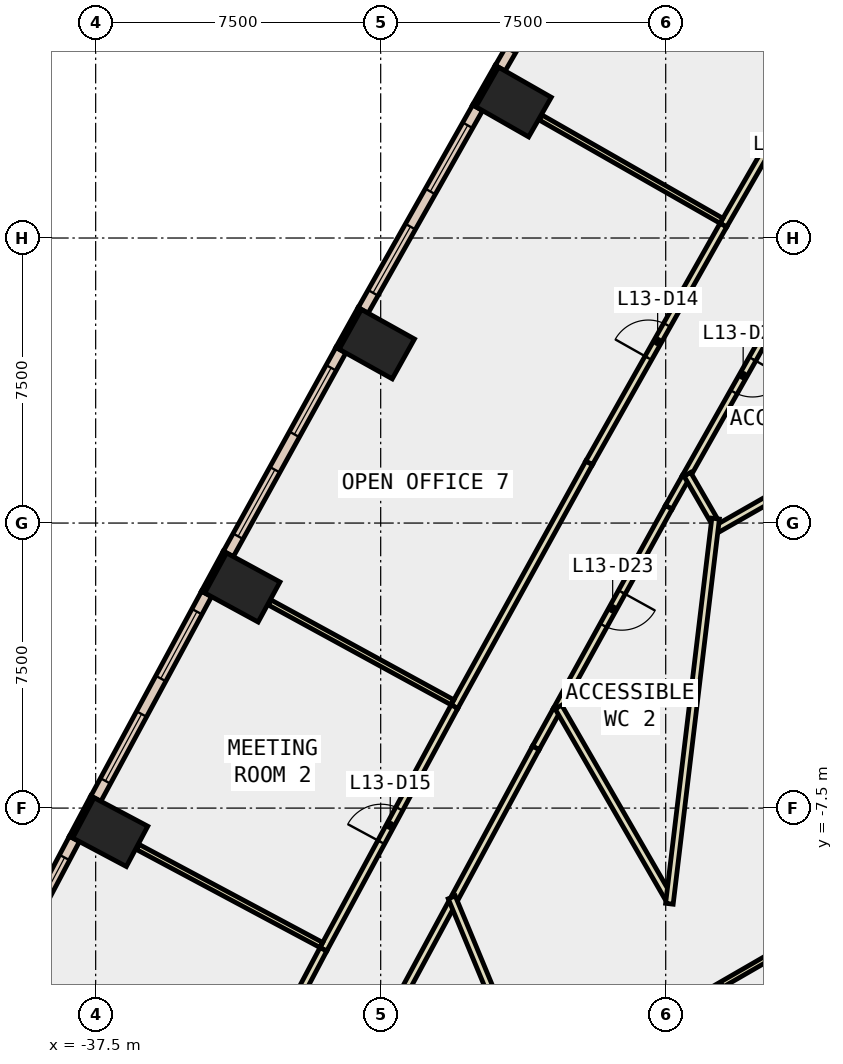
"""IFC4 building model, lengths in metres.
Left out: names, types, materials, properties, quantities, classifications, styles, units other than length and angle.
Written with IfcOpenShell. Run it as: python <this file> out.ifc"""

import sys

from ifc_helpers import new_model, si_unit, direction, frame, frame_2d, origin, origin_2d, place, context, subcontext, project, spatial, rectangle, extrude, element, fill, save


model = new_model("IFC4")
c1 = context("Model", 3, precision=1e-05, world=origin(), true_north=direction((0.0, 1.0)))
c2 = subcontext(c1, "Body", "Model", "MODEL_VIEW")
j1 = project(units=[si_unit("LENGTHUNIT", "METRE"), si_unit("PLANEANGLEUNIT", "RADIAN")], contexts=[c1])
p1 = place(None, origin())
s1 = spatial("IfcSite", under=j1, at=p1, CompositionType="ELEMENT")
p2 = place(p1, origin())
s2 = spatial("IfcBuilding", under=s1, at=p2, CompositionType="ELEMENT")
p3 = place(p2, frame((0.0, 0.0, 64.4)))
s3 = spatial("IfcBuildingStorey", under=s2, at=p3, CompositionType="ELEMENT", Elevation=64.4)
for number, where, z_axis, x_axis in (
    (1, (-26.503, 11.078, -0.4), (0.0, 0.0, 1.0), (0.496, 0.869, 0.0)),
    (2, (-30.102, 4.708, -0.4), (0.0, 0.0, 1.0), (0.487, 0.873, 0.0)),
    (3, (-33.64, -1.695, -0.4), (0.0, 0.0, 1.0), (0.478, 0.878, 0.0)),
    (4, (-37.117, -8.132, -0.4), (0.0, 0.0, 1.0), (0.469, 0.883, 0.0)),
):
    element("IfcColumn", number, at=place(p3, frame(where, z_axis=z_axis, x_axis=x_axis)), inside=s3, PredefinedType="COLUMN", context=c2, shape_type="SweptSolid", body=[
        extrude(rectangle(XDim=1.2, YDim=1.6, at=origin_2d()), origin(), (0.0, 0.0, 1.0), 4.2),
    ])
p4 = place(p3, frame((-26.944, 12.02, 0.0), z_axis=(0.0, 0.0, 1.0), x_axis=(-0.495854054996, -0.868405870629, 0.0)))
e5 = element("IfcWall", 5, at=p4, inside=s3, PredefinedType="STANDARD", context=c2, shape_type="SweptSolid", body=[
    extrude(rectangle(XDim=1.2, YDim=0.1, at=frame_2d((0.6, 0.0))), origin(), (0.0, 0.0, 1.0), 3.8),
])
p5 = place(p3, frame((-30.552, 5.646, 0.0), z_axis=(0.0, 0.0, 1.0), x_axis=(-0.486730996044, -0.87355190887, 0.0)))
e6 = element("IfcWall", 6, at=p5, inside=s3, PredefinedType="STANDARD", context=c2, shape_type="SweptSolid", body=[
    extrude(rectangle(XDim=1.2, YDim=0.1, at=frame_2d((0.6, 0.0))), origin(), (0.0, 0.0, 1.0), 3.8),
])
p6 = place(p3, frame((-34.099, -0.762, 0.0), z_axis=(0.0, 0.0, 1.0), x_axis=(-0.478267644701, -0.878214131082, 0.0)))
e7 = element("IfcWall", 7, at=p6, inside=s3, PredefinedType="STANDARD", context=c2, shape_type="SweptSolid", body=[
    extrude(rectangle(XDim=1.2, YDim=0.1, at=frame_2d((0.6, 0.0))), origin(), (0.0, 0.0, 1.0), 3.8),
])
p7 = place(p3, frame((-37.586, -7.204, 0.0), z_axis=(0.0, 0.0, 1.0), x_axis=(-0.469467784567, -0.882949601763, 0.0)))
e8 = element("IfcWall", 8, at=p7, inside=s3, PredefinedType="STANDARD", context=c2, shape_type="SweptSolid", body=[
    extrude(rectangle(XDim=1.199, YDim=0.1, at=frame_2d((0.6, 0.0))), origin(), (0.0, 0.0, 1.0), 3.8),
])
p8 = place(p3, frame((-23.793, 17.273, 0.0), z_axis=(0.0, 0.0, 1.0), x_axis=(-0.499903021601, -0.86608138705, 0.0)))
e9 = element("IfcWall", 9, at=p8, inside=s3, PredefinedType="STANDARD", context=c2, shape_type="SweptSolid", body=[
    extrude(rectangle(XDim=6.125, YDim=0.3, at=frame_2d((3.062, 0.0))), origin(), (0.0, 0.0, 1.0), 3.8),
])
p9 = place(p8, frame((0.531, 0.0, 0.9)))
e10 = element("IfcOpeningElement", 10, at=p9, cuts=e9, PredefinedType="OPENING", context=c2, shape_type="SweptSolid", body=[
    extrude(rectangle(XDim=2.0, YDim=2.6, at=frame_2d((1.0, 1.3))), frame((0.0, 0.16, 0.0), z_axis=(0.0, -1.0, 0.0), x_axis=(1.0, 0.0, 0.0)), (0.0, 0.0, 1.0), 0.32),
])
p10 = place(p8, frame((3.594, 0.0, 0.9)))
e11 = element("IfcOpeningElement", 11, at=p10, cuts=e9, PredefinedType="OPENING", context=c2, shape_type="SweptSolid", body=[
    extrude(rectangle(XDim=2.0, YDim=2.6, at=frame_2d((1.0, 1.3))), frame((0.0, 0.16, 0.0), z_axis=(0.0, -1.0, 0.0), x_axis=(1.0, 0.0, 0.0)), (0.0, 0.0, 1.0), 0.32),
])
p11 = place(p3, frame((-27.449, 10.928, 0.0), z_axis=(0.0, 0.0, 1.0), x_axis=(-0.491887822214, -0.870658584267, 0.0)))
e12 = element("IfcWall", 12, at=p11, inside=s3, PredefinedType="STANDARD", context=c2, shape_type="SweptSolid", body=[
    extrude(rectangle(XDim=6.125, YDim=0.3, at=frame_2d((3.062, 0.0))), origin(), (0.0, 0.0, 1.0), 3.8),
])
p12 = place(p11, frame((0.531, 0.0, 0.9)))
e13 = element("IfcOpeningElement", 13, at=p12, cuts=e12, PredefinedType="OPENING", context=c2, shape_type="SweptSolid", body=[
    extrude(rectangle(XDim=2.0, YDim=2.6, at=frame_2d((1.0, 1.3))), frame((0.0, 0.16, 0.0), z_axis=(0.0, -1.0, 0.0), x_axis=(1.0, 0.0, 0.0)), (0.0, 0.0, 1.0), 0.32),
])
p13 = place(p11, frame((3.594, 0.0, 0.9)))
e14 = element("IfcOpeningElement", 14, at=p13, cuts=e12, PredefinedType="OPENING", context=c2, shape_type="SweptSolid", body=[
    extrude(rectangle(XDim=2.0, YDim=2.6, at=frame_2d((1.0, 1.3))), frame((0.0, 0.16, 0.0), z_axis=(0.0, -1.0, 0.0), x_axis=(1.0, 0.0, 0.0)), (0.0, 0.0, 1.0), 0.32),
])
p14 = place(p3, frame((-31.047, 4.549, 0.0), z_axis=(0.0, 0.0, 1.0), x_axis=(-0.483587271547, -0.875296150339, 0.0)))
e15 = element("IfcWall", 15, at=p14, inside=s3, PredefinedType="STANDARD", context=c2, shape_type="SweptSolid", body=[
    extrude(rectangle(XDim=6.125, YDim=0.3, at=frame_2d((3.062, 0.0))), origin(), (0.0, 0.0, 1.0), 3.8),
])
p15 = place(p14, frame((0.531, 0.0, 0.9)))
e16 = element("IfcOpeningElement", 16, at=p15, cuts=e15, PredefinedType="OPENING", context=c2, shape_type="SweptSolid", body=[
    extrude(rectangle(XDim=2.0, YDim=2.6, at=frame_2d((1.0, 1.3))), frame((0.0, 0.16, 0.0), z_axis=(0.0, -1.0, 0.0), x_axis=(1.0, 0.0, 0.0)), (0.0, 0.0, 1.0), 0.32),
])
p16 = place(p14, frame((3.594, 0.0, 0.9)))
e17 = element("IfcOpeningElement", 17, at=p16, cuts=e15, PredefinedType="OPENING", context=c2, shape_type="SweptSolid", body=[
    extrude(rectangle(XDim=2.0, YDim=2.6, at=frame_2d((1.0, 1.3))), frame((0.0, 0.16, 0.0), z_axis=(0.0, -1.0, 0.0), x_axis=(1.0, 0.0, 0.0)), (0.0, 0.0, 1.0), 0.32),
])
p17 = place(p3, frame((-34.583, -1.864, 0.0), z_axis=(0.0, 0.0, 1.0), x_axis=(-0.475413659872, -0.879762383833, 0.0)))
e18 = element("IfcWall", 18, at=p17, inside=s3, PredefinedType="STANDARD", context=c2, shape_type="SweptSolid", body=[
    extrude(rectangle(XDim=6.125, YDim=0.3, at=frame_2d((3.063, 0.0))), origin(), (0.0, 0.0, 1.0), 3.8),
])
p18 = place(p17, frame((0.531, 0.0, 0.9)))
e19 = element("IfcOpeningElement", 19, at=p18, cuts=e18, PredefinedType="OPENING", context=c2, shape_type="SweptSolid", body=[
    extrude(rectangle(XDim=2.0, YDim=2.6, at=frame_2d((1.0, 1.3))), frame((0.0, 0.16, 0.0), z_axis=(0.0, -1.0, 0.0), x_axis=(1.0, 0.0, 0.0)), (0.0, 0.0, 1.0), 0.32),
])
p19 = place(p17, frame((3.594, 0.0, 0.9)))
e20 = element("IfcOpeningElement", 20, at=p19, cuts=e18, PredefinedType="OPENING", context=c2, shape_type="SweptSolid", body=[
    extrude(rectangle(XDim=2.0, YDim=2.6, at=frame_2d((1.0, 1.3))), frame((0.0, 0.16, 0.0), z_axis=(0.0, -1.0, 0.0), x_axis=(1.0, 0.0, 0.0)), (0.0, 0.0, 1.0), 0.32),
])
p20 = place(p3, frame((-38.059, -8.31, 0.0), z_axis=(0.0, 0.0, 1.0), x_axis=(-0.467041710902, -0.884235285587, 0.0)))
e21 = element("IfcWall", 21, at=p20, inside=s3, PredefinedType="STANDARD", context=c2, shape_type="SweptSolid", body=[
    extrude(rectangle(XDim=6.22, YDim=0.3, at=frame_2d((3.11, 0.0))), origin(), (0.0, 0.0, 1.0), 3.8),
])
p21 = place(p20, frame((0.555, 0.0, 0.9)))
e22 = element("IfcOpeningElement", 22, at=p21, cuts=e21, PredefinedType="OPENING", context=c2, shape_type="SweptSolid", body=[
    extrude(rectangle(XDim=2.0, YDim=2.6, at=frame_2d((1.0, 1.3))), frame((0.0, 0.16, 0.0), z_axis=(0.0, -1.0, 0.0), x_axis=(1.0, 0.0, 0.0)), (0.0, 0.0, 1.0), 0.32),
])
p22 = place(p20, frame((3.665, 0.0, 0.9)))
e23 = element("IfcOpeningElement", 23, at=p22, cuts=e21, PredefinedType="OPENING", context=c2, shape_type="SweptSolid", body=[
    extrude(rectangle(XDim=2.0, YDim=2.6, at=frame_2d((1.0, 1.3))), frame((0.0, 0.16, 0.0), z_axis=(0.0, -1.0, 0.0), x_axis=(1.0, 0.0, 0.0)), (0.0, 0.0, 1.0), 0.32),
])
p23 = place(p3, frame((-18.945, 6.567, 0.0), z_axis=(0.0, 0.0, 1.0), x_axis=(-0.491840751019, -0.87068517596, 0.0)))
e24 = element("IfcWall", 24, at=p23, inside=s3, PredefinedType="PARTITIONING", context=c2, shape_type="SweptSolid", body=[
    extrude(rectangle(XDim=6.168, YDim=0.2, at=frame_2d((3.084, 0.0))), origin(), (0.0, 0.0, 1.0), 3.8),
])
p24 = place(p23, frame((2.584, 0.0, 0.0)))
e25 = element("IfcOpeningElement", 25, at=p24, cuts=e24, PredefinedType="OPENING", context=c2, shape_type="SweptSolid", body=[
    extrude(rectangle(XDim=1.0, YDim=2.1, at=frame_2d((0.5, 1.05))), frame((0.0, 0.11, 0.0), z_axis=(0.0, -1.0, 0.0), x_axis=(1.0, 0.0, 0.0)), (0.0, 0.0, 1.0), 0.22),
])
p25 = place(p3, frame((-25.371, -4.927, 0.0), z_axis=(0.0, 0.0, 1.0), x_axis=(-0.483899488004, -0.875123582993, 0.0)))
e26 = element("IfcWall", 26, at=p25, inside=s3, PredefinedType="PARTITIONING", context=c2, shape_type="SweptSolid", body=[
    extrude(rectangle(XDim=1.13, YDim=0.2, at=frame_2d((0.565, 0.0))), origin(), (0.0, 0.0, 1.0), 3.8),
])
p26 = place(p3, frame((-25.918, -5.916, 0.0), z_axis=(0.0, 0.0, 1.0), x_axis=(-0.4752384902, -0.879857021016, 0.0)))
e27 = element("IfcWall", 27, at=p26, inside=s3, PredefinedType="PARTITIONING", context=c2, shape_type="SweptSolid", body=[
    extrude(rectangle(XDim=4.473, YDim=0.2, at=frame_2d((2.237, 0.0))), origin(), (0.0, 0.0, 1.0), 3.8),
])
p27 = place(p3, frame((-21.979, 1.196, 0.0), z_axis=(0.0, 0.0, 1.0), x_axis=(-0.491617674369, -0.870811151886, 0.0)))
e28 = element("IfcWall", 28, at=p27, inside=s3, PredefinedType="PARTITIONING", context=c2, shape_type="SweptSolid", body=[
    extrude(rectangle(XDim=0.897, YDim=0.2, at=frame_2d((0.448, 0.0))), origin(), (0.0, 0.0, 1.0), 3.8),
])
p28 = place(p3, frame((-22.42, 0.415, 0.0), z_axis=(0.0, 0.0, 1.0), x_axis=(-0.483559496818, -0.875311494861, 0.0)))
e29 = element("IfcWall", 29, at=p28, inside=s3, PredefinedType="PARTITIONING", context=c2, shape_type="SweptSolid", body=[
    extrude(rectangle(XDim=6.103, YDim=0.2, at=frame_2d((3.052, 0.0))), origin(), (0.0, 0.0, 1.0), 3.8),
])
p29 = place(p28, frame((2.552, 0.0, 0.0)))
e30 = element("IfcOpeningElement", 30, at=p29, cuts=e29, PredefinedType="OPENING", context=c2, shape_type="SweptSolid", body=[
    extrude(rectangle(XDim=1.0, YDim=2.1, at=frame_2d((0.5, 1.05))), frame((0.0, 0.11, 0.0), z_axis=(0.0, -1.0, 0.0), x_axis=(1.0, 0.0, 0.0)), (0.0, 0.0, 1.0), 0.22),
])
p30 = place(p3, frame((-28.139, -10.028, 0.0), z_axis=(0.0, 0.0, 1.0), x_axis=(-0.475287687013, -0.879830446491, 0.0)))
e31 = element("IfcWall", 31, at=p30, inside=s3, PredefinedType="PARTITIONING", context=c2, shape_type="SweptSolid", body=[
    extrude(rectangle(XDim=2.561, YDim=0.2, at=frame_2d((1.28, 0.0))), origin(), (0.0, 0.0, 1.0), 3.8),
])
p31 = place(p3, frame((-17.356, 14.122, 0.0), z_axis=(0.0, 0.0, 1.0), x_axis=(-0.499946764175, -0.866056137321, 0.0)))
e32 = element("IfcWall", 32, at=p31, inside=s3, PredefinedType="PARTITIONING", context=c2, shape_type="SweptSolid", body=[
    extrude(rectangle(XDim=7.255, YDim=0.2, at=frame_2d((3.627, 0.0))), origin(), (0.0, 0.0, 1.0), 3.8),
])
p32 = place(p31, frame((3.052, 0.0, 0.0)))
e33 = element("IfcOpeningElement", 33, at=p32, cuts=e32, PredefinedType="OPENING", context=c2, shape_type="SweptSolid", body=[
    extrude(rectangle(XDim=1.0, YDim=2.1, at=frame_2d((0.5, 1.05))), frame((0.0, 0.11, 0.0), z_axis=(0.0, -1.0, 0.0), x_axis=(1.0, 0.0, 0.0)), (0.0, 0.0, 1.0), 0.22),
])
p33 = place(p3, frame((-28.06, -4.831, 0.0), z_axis=(0.0, 0.0, 1.0), x_axis=(0.483631054848, 0.875271959328, 0.0)))
e34 = element("IfcWall", 34, at=p33, inside=s3, PredefinedType="PARTITIONING", context=c2, shape_type="SweptSolid", body=[
    extrude(rectangle(XDim=7.33, YDim=0.2, at=frame_2d((3.665, 0.0))), origin(), (0.0, 0.0, 1.0), 3.8),
])
p34 = place(p3, frame((-24.515, 1.585, 0.0), z_axis=(0.0, 0.0, 1.0), x_axis=(0.49174361417, 0.870740040381, 0.0)))
e35 = element("IfcWall", 35, at=p34, inside=s3, PredefinedType="PARTITIONING", context=c2, shape_type="SweptSolid", body=[
    extrude(rectangle(XDim=7.183, YDim=0.2, at=frame_2d((3.591, 0.0))), origin(), (0.0, 0.0, 1.0), 3.8),
])
p35 = place(p34, frame((3.166, 0.0, 0.0)))
e36 = element("IfcOpeningElement", 36, at=p35, cuts=e35, PredefinedType="OPENING", context=c2, shape_type="SweptSolid", body=[
    extrude(rectangle(XDim=1.0, YDim=2.1, at=frame_2d((0.5, 1.05))), frame((0.0, 0.11, 0.0), z_axis=(0.0, -1.0, 0.0), x_axis=(1.0, 0.0, 0.0)), (0.0, 0.0, 1.0), 0.22),
])
p36 = place(p3, frame((-31.509, -11.216, 0.0), z_axis=(0.0, 0.0, 1.0), x_axis=(0.475367159168, 0.879787510701, 0.0)))
e37 = element("IfcWall", 37, at=p36, inside=s3, PredefinedType="PARTITIONING", context=c2, shape_type="SweptSolid", body=[
    extrude(rectangle(XDim=7.257, YDim=0.2, at=frame_2d((3.629, 0.0))), origin(), (0.0, 0.0, 1.0), 3.8),
])
p37 = place(p36, frame((3.203, 0.0, 0.0)))
e38 = element("IfcOpeningElement", 38, at=p37, cuts=e37, PredefinedType="OPENING", context=c2, shape_type="SweptSolid", body=[
    extrude(rectangle(XDim=1.0, YDim=2.1, at=frame_2d((0.5, 1.05))), frame((0.0, 0.11, 0.0), z_axis=(0.0, -1.0, 0.0), x_axis=(1.0, 0.0, 0.0)), (0.0, 0.0, 1.0), 0.22),
])
p38 = place(p3, frame((-34.692, -17.243, 0.0), z_axis=(0.0, 0.0, 1.0), x_axis=(0.467102540817, 0.884203153332, 0.0)))
e39 = element("IfcWall", 39, at=p38, inside=s3, PredefinedType="PARTITIONING", context=c2, shape_type="SweptSolid", body=[
    extrude(rectangle(XDim=6.816, YDim=0.2, at=frame_2d((3.408, 0.0))), origin(), (0.0, 0.0, 1.0), 3.8),
])
p39 = place(p38, frame((2.946, 0.0, 0.0)))
e40 = element("IfcOpeningElement", 40, at=p39, cuts=e39, PredefinedType="OPENING", context=c2, shape_type="SweptSolid", body=[
    extrude(rectangle(XDim=1.0, YDim=2.1, at=frame_2d((0.5, 1.05))), frame((0.0, 0.11, 0.0), z_axis=(0.0, -1.0, 0.0), x_axis=(1.0, 0.0, 0.0)), (0.0, 0.0, 1.0), 0.22),
])
p40 = place(p3, frame((-14.946, 3.387, 0.0), z_axis=(0.0, 0.0, 1.0), x_axis=(-0.868556003823, -0.4955910292, 0.0)))
e41 = element("IfcWall", 41, at=p40, inside=s3, PredefinedType="PARTITIONING", context=c2, shape_type="SweptSolid", body=[
    extrude(rectangle(XDim=7.199, YDim=0.2, at=frame_2d((3.6, 0.0))), origin(), (0.0, 0.0, 1.0), 3.8),
])
p41 = place(p3, frame((-21.249, 0.105, 0.0), z_axis=(0.0, 0.0, 1.0), x_axis=(-0.500442009317, 0.865770059144, 0.0)))
e42 = element("IfcWall", 42, at=p41, inside=s3, PredefinedType="PARTITIONING", context=c2, shape_type="SweptSolid", body=[
    extrude(rectangle(XDim=1.361, YDim=0.2, at=frame_2d((0.68, 0.0))), origin(), (0.0, 0.0, 1.0), 3.8),
])
p42 = place(p3, frame((-25.323, -4.84, 0.0), z_axis=(0.0, 0.0, 1.0), x_axis=(0.500070797646, -0.865984524886, 0.0)))
e43 = element("IfcWall", 43, at=p42, inside=s3, PredefinedType="PARTITIONING", context=c2, shape_type="SweptSolid", body=[
    extrude(rectangle(XDim=5.763, YDim=0.2, at=frame_2d((2.882, 0.0))), origin(), (0.0, 0.0, 1.0), 3.8),
])
p43 = place(p3, frame((-22.403, -10.017, 0.0), z_axis=(0.0, 0.0, 1.0), x_axis=(0.119143334217, 0.992877064853, 0.0)))
e44 = element("IfcWall", 44, at=p43, inside=s3, PredefinedType="PARTITIONING", context=c2, shape_type="SweptSolid", body=[
    extrude(rectangle(XDim=10.207, YDim=0.2, at=frame_2d((5.104, 0.0))), origin(), (0.0, 0.0, 1.0), 3.8),
])
p44 = place(p3, frame((-17.103, -9.878, 0.0), z_axis=(0.0, 0.0, 1.0), x_axis=(-0.866013358989, -0.500020861617, 0.0)))
e45 = element("IfcWall", 45, at=p44, inside=s3, PredefinedType="PARTITIONING", context=c2, shape_type="SweptSolid", body=[
    extrude(rectangle(XDim=4.674, YDim=0.15, at=frame_2d((2.337, 0.0))), origin(), (0.0, 0.0, 1.0), 3.8),
])
p45 = place(p3, frame((-26.015, -14.946, 0.0), z_axis=(0.0, 0.0, 1.0), x_axis=(-0.383189005855, 0.923669955012, 0.0)))
e46 = element("IfcWall", 46, at=p45, inside=s3, PredefinedType="PARTITIONING", context=c2, shape_type="SweptSolid", body=[
    extrude(rectangle(XDim=5.52, YDim=0.2, at=frame_2d((2.76, 0.0))), origin(), (0.0, 0.0, 1.0), 3.8),
])
p46 = place(p3, frame((-16.767, -19.658, 0.0), z_axis=(0.0, 0.0, 1.0), x_axis=(-0.500083586486, 0.865977139726, 0.0)))
e47 = element("IfcWall", 47, at=p46, inside=s3, PredefinedType="PARTITIONING", context=c2, shape_type="SweptSolid", body=[
    extrude(rectangle(XDim=8.68, YDim=0.15, at=frame_2d((4.34, 0.0))), origin(), (0.0, 0.0, 1.0), 3.8),
])
p47 = place(p3, frame((-21.033, 7.953, 0.0), z_axis=(0.0, 0.0, 1.0), x_axis=(-0.868311678357, 0.496018980715, 0.0)))
e48 = element("IfcWall", 48, at=p47, inside=s3, PredefinedType="PARTITIONING", context=c2, shape_type="SweptSolid", body=[
    extrude(rectangle(XDim=5.48, YDim=0.15, at=frame_2d((2.74, 0.0))), origin(), (0.0, 0.0, 1.0), 3.8),
])
p48 = place(p3, frame((-28.111, -4.717, 0.0), z_axis=(0.0, 0.0, 1.0), x_axis=(-0.877558297547, 0.479469951515, 0.0)))
e49 = element("IfcWall", 49, at=p48, inside=s3, PredefinedType="PARTITIONING", context=c2, shape_type="SweptSolid", body=[
    extrude(rectangle(XDim=5.481, YDim=0.15, at=frame_2d((2.74, 0.0))), origin(), (0.0, 0.0, 1.0), 3.8),
])
p49 = place(p3, frame((-31.561, -11.103, 0.0), z_axis=(0.0, 0.0, 1.0), x_axis=(-0.882056805494, 0.47114306944, 0.0)))
e50 = element("IfcWall", 50, at=p49, inside=s3, PredefinedType="PARTITIONING", context=c2, shape_type="SweptSolid", body=[
    extrude(rectangle(XDim=5.48, YDim=0.15, at=frame_2d((2.74, 0.0))), origin(), (0.0, 0.0, 1.0), 3.8),
])
p50 = place(p12, origin())
e51 = element("IfcWindow", 51, at=p50, inside=s3, PartitioningType="SINGLE_PANEL", PredefinedType="WINDOW", context=c2, shape_type="SweptSolid", body=[
    extrude(rectangle(XDim=2.0, YDim=2.6, at=frame_2d((1.0, 1.3))), frame((0.0, 0.03, 0.0), z_axis=(0.0, -1.0, 0.0), x_axis=(1.0, 0.0, 0.0)), (0.0, 0.0, 1.0), 0.06),
])
fill(e13, e51)
p51 = place(p13, origin())
e52 = element("IfcWindow", 52, at=p51, inside=s3, PartitioningType="SINGLE_PANEL", PredefinedType="WINDOW", context=c2, shape_type="SweptSolid", body=[
    extrude(rectangle(XDim=2.0, YDim=2.6, at=frame_2d((1.0, 1.3))), frame((0.0, 0.03, 0.0), z_axis=(0.0, -1.0, 0.0), x_axis=(1.0, 0.0, 0.0)), (0.0, 0.0, 1.0), 0.06),
])
fill(e14, e52)
p52 = place(p15, origin())
e53 = element("IfcWindow", 53, at=p52, inside=s3, PartitioningType="SINGLE_PANEL", PredefinedType="WINDOW", context=c2, shape_type="SweptSolid", body=[
    extrude(rectangle(XDim=2.0, YDim=2.6, at=frame_2d((1.0, 1.3))), frame((0.0, 0.03, 0.0), z_axis=(0.0, -1.0, 0.0), x_axis=(1.0, 0.0, 0.0)), (0.0, 0.0, 1.0), 0.06),
])
fill(e16, e53)
p53 = place(p16, origin())
e54 = element("IfcWindow", 54, at=p53, inside=s3, PartitioningType="SINGLE_PANEL", PredefinedType="WINDOW", context=c2, shape_type="SweptSolid", body=[
    extrude(rectangle(XDim=2.0, YDim=2.6, at=frame_2d((1.0, 1.3))), frame((0.0, 0.03, 0.0), z_axis=(0.0, -1.0, 0.0), x_axis=(1.0, 0.0, 0.0)), (0.0, 0.0, 1.0), 0.06),
])
fill(e17, e54)
p54 = place(p18, origin())
e55 = element("IfcWindow", 55, at=p54, inside=s3, PartitioningType="SINGLE_PANEL", PredefinedType="WINDOW", context=c2, shape_type="SweptSolid", body=[
    extrude(rectangle(XDim=2.0, YDim=2.6, at=frame_2d((1.0, 1.3))), frame((0.0, 0.03, 0.0), z_axis=(0.0, -1.0, 0.0), x_axis=(1.0, 0.0, 0.0)), (0.0, 0.0, 1.0), 0.06),
])
fill(e19, e55)
p55 = place(p19, origin())
e56 = element("IfcWindow", 56, at=p55, inside=s3, PartitioningType="SINGLE_PANEL", PredefinedType="WINDOW", context=c2, shape_type="SweptSolid", body=[
    extrude(rectangle(XDim=2.0, YDim=2.6, at=frame_2d((1.0, 1.3))), frame((0.0, 0.03, 0.0), z_axis=(0.0, -1.0, 0.0), x_axis=(1.0, 0.0, 0.0)), (0.0, 0.0, 1.0), 0.06),
])
fill(e20, e56)
p56 = place(p21, origin())
e57 = element("IfcWindow", 57, at=p56, inside=s3, PartitioningType="SINGLE_PANEL", PredefinedType="WINDOW", context=c2, shape_type="SweptSolid", body=[
    extrude(rectangle(XDim=2.0, YDim=2.6, at=frame_2d((1.0, 1.3))), frame((0.0, 0.03, 0.0), z_axis=(0.0, -1.0, 0.0), x_axis=(1.0, 0.0, 0.0)), (0.0, 0.0, 1.0), 0.06),
])
fill(e22, e57)
p57 = place(p35, origin())
e58 = element("IfcDoor", 58, at=p57, inside=s3, OperationType="SINGLE_SWING_RIGHT", PredefinedType="DOOR", context=c2, shape_type="SweptSolid", body=[
    extrude(rectangle(XDim=1.0, YDim=2.1, at=frame_2d((0.5, 1.05))), frame((0.0, 0.025, 0.0), z_axis=(0.0, -1.0, 0.0), x_axis=(1.0, 0.0, 0.0)), (0.0, 0.0, 1.0), 0.05),
])
fill(e36, e58)
p58 = place(p37, origin())
e59 = element("IfcDoor", 59, at=p58, inside=s3, OperationType="SINGLE_SWING_RIGHT", PredefinedType="DOOR", context=c2, shape_type="SweptSolid", body=[
    extrude(rectangle(XDim=1.0, YDim=2.1, at=frame_2d((0.5, 1.05))), frame((0.0, 0.025, 0.0), z_axis=(0.0, -1.0, 0.0), x_axis=(1.0, 0.0, 0.0)), (0.0, 0.0, 1.0), 0.05),
])
fill(e38, e59)
p59 = place(p24, origin())
e60 = element("IfcDoor", 60, at=p59, inside=s3, OperationType="SINGLE_SWING_LEFT", PredefinedType="DOOR", context=c2, shape_type="SweptSolid", body=[
    extrude(rectangle(XDim=1.0, YDim=2.1, at=frame_2d((0.5, 1.05))), frame((0.0, 0.025, 0.0), z_axis=(0.0, -1.0, 0.0), x_axis=(1.0, 0.0, 0.0)), (0.0, 0.0, 1.0), 0.05),
])
fill(e25, e60)
p60 = place(p29, origin())
e61 = element("IfcDoor", 61, at=p60, inside=s3, OperationType="SINGLE_SWING_LEFT", PredefinedType="DOOR", context=c2, shape_type="SweptSolid", body=[
    extrude(rectangle(XDim=1.0, YDim=2.1, at=frame_2d((0.5, 1.05))), frame((0.0, 0.025, 0.0), z_axis=(0.0, -1.0, 0.0), x_axis=(1.0, 0.0, 0.0)), (0.0, 0.0, 1.0), 0.05),
])
fill(e30, e61)
save(model, sys.argv[1])
